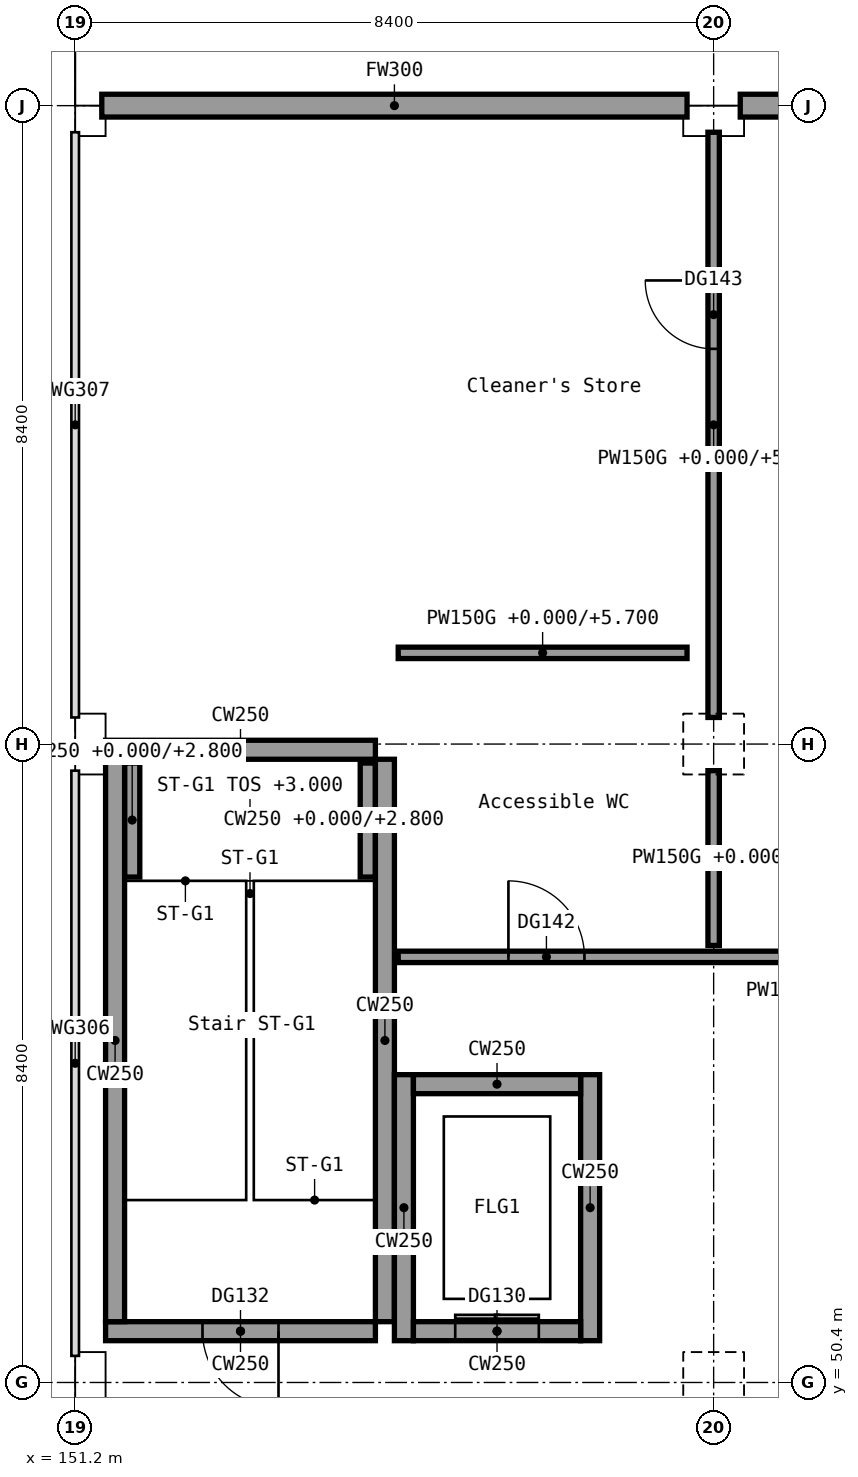
"""IFC4 building model, lengths in metres.
Left out: names, types, materials, properties, quantities, classifications, styles, units other than length and angle.
Written with IfcOpenShell. Run it as: python <this file> out.ifc"""

import sys

from ifc_helpers import new_model, si_unit, direction, frame, frame_2d, origin, origin_2d, place, context, subcontext, project, spatial, rectangle, extrude, element, fill, save


model = new_model("IFC4")
c1 = context("Model", 3, precision=1e-05, world=origin(), true_north=direction((0.0, 1.0)))
c2 = subcontext(c1, "Body", "Model", "MODEL_VIEW")
j1 = project(units=[si_unit("LENGTHUNIT", "METRE"), si_unit("PLANEANGLEUNIT", "RADIAN")], contexts=[c1])
p1 = place(None, origin())
s1 = spatial("IfcSite", under=j1, at=p1, CompositionType="ELEMENT")
p2 = place(p1, origin())
s2 = spatial("IfcBuilding", under=s1, at=p2, CompositionType="ELEMENT")
p3 = place(p2, origin())
s3 = spatial("IfcBuildingStorey", under=s2, at=p3, CompositionType="ELEMENT", Elevation=0.0)
for number, where, z_axis, x_axis in (
    (1, (151.2, 50.4, 0.0), (0.0, 0.0, 1.0), (1.0, 0.0, 0.0)),
    (2, (151.2, 58.8, 0.0), (0.0, 0.0, 1.0), (1.0, 0.0, 0.0)),
    (3, (151.2, 67.2, 0.0), (0.0, 0.0, 1.0), (1.0, 0.0, 0.0)),
    (4, (159.6, 50.4, 0.0), (0.0, 0.0, 1.0), (1.0, 0.0, 0.0)),
    (5, (159.6, 58.8, 0.0), (0.0, 0.0, 1.0), (1.0, 0.0, 0.0)),
    (6, (159.6, 67.2, 0.0), (0.0, 0.0, 1.0), (1.0, 0.0, 0.0)),
):
    element("IfcColumn", number, at=place(p3, frame(where, z_axis=z_axis, x_axis=x_axis)), inside=s3, PredefinedType="COLUMN", context=c2, shape_type="SweptSolid", body=[
        extrude(rectangle(XDim=0.7, YDim=0.7, at=origin_2d()), origin(), (0.0, 0.0, 1.0), 6.0),
    ])
p4 = place(p3, frame((151.55, 67.2, 0.0), z_axis=(0.0, 0.0, 1.0), x_axis=(1.0, 0.0, 0.0)))
e7 = element("IfcWall", 7, at=p4, inside=s3, PredefinedType="STANDARD", context=c2, shape_type="SweptSolid", body=[
    extrude(rectangle(XDim=7.7, YDim=0.3, at=frame_2d((3.85, 0.0))), origin(), (0.0, 0.0, 1.0), 6.0),
])
p5 = place(p3, frame((159.95, 67.2, 0.0), z_axis=(0.0, 0.0, 1.0), x_axis=(1.0, 0.0, 0.0)))
e8 = element("IfcWall", 8, at=p5, inside=s3, PredefinedType="STANDARD", context=c2, shape_type="SweptSolid", body=[
    extrude(rectangle(XDim=7.7, YDim=0.3, at=frame_2d((3.85, 0.0))), origin(), (0.0, 0.0, 1.0), 6.0),
])
p6 = place(p5, frame((2.95, 0.0, 0.9)))
e9 = element("IfcOpeningElement", 9, at=p6, cuts=e8, PredefinedType="OPENING", context=c2, shape_type="SweptSolid", body=[
    extrude(rectangle(XDim=1.8, YDim=1.5, at=frame_2d((0.9, 0.75))), frame((0.0, 0.15, 0.0), z_axis=(0.0, -1.0, 0.0), x_axis=(1.0, 0.0, 0.0)), (0.0, 0.0, 1.0), 0.3),
])
for number, where, z_axis, x_axis in (
    (10, (155.05, 57.05, 0.0), (0.0, 0.0, 1.0), (0.0, 1.0, 0.0)),
    (11, (151.95, 58.55, 0.0), (0.0, 0.0, 1.0), (0.0, -1.0, 0.0)),
):
    element("IfcWall", number, at=place(p3, frame(where, z_axis=z_axis, x_axis=x_axis)), inside=s3, PredefinedType="SHEAR", context=c2, shape_type="SweptSolid", body=[
        extrude(rectangle(XDim=1.5, YDim=0.2, at=frame_2d((0.75, 0.0))), origin(), (0.0, 0.0, 1.0), 2.8),
    ])
p7 = place(p3, frame((155.15, 51.075, 0.0), z_axis=(0.0, 0.0, 1.0), x_axis=(-1.0, 0.0, 0.0)))
e12 = element("IfcWall", 12, at=p7, inside=s3, PredefinedType="SHEAR", context=c2, shape_type="SweptSolid", body=[
    extrude(rectangle(XDim=3.55, YDim=0.25, at=frame_2d((1.775, 0.0))), origin(), (0.0, 0.0, 1.0), 6.0),
])
p8 = place(p7, frame((1.275, 0.0, 0.0)))
e13 = element("IfcOpeningElement", 13, at=p8, cuts=e12, PredefinedType="OPENING", context=c2, shape_type="SweptSolid", body=[
    extrude(rectangle(XDim=1.0, YDim=2.1, at=frame_2d((0.5, 1.05))), frame((0.0, 0.125, 0.0), z_axis=(0.0, -1.0, 0.0), x_axis=(1.0, 0.0, 0.0)), (0.0, 0.0, 1.0), 0.25),
])
p9 = place(p3, frame((155.15, 58.725, 0.0), z_axis=(0.0, 0.0, 1.0), x_axis=(-1.0, 0.0, 0.0)))
e14 = element("IfcWall", 14, at=p9, inside=s3, PredefinedType="SHEAR", context=c2, shape_type="SweptSolid", body=[
    extrude(rectangle(XDim=3.55, YDim=0.25, at=frame_2d((1.775, 0.0))), origin(), (0.0, 0.0, 1.0), 6.0),
])
for number, where, z_axis, x_axis in (
    (15, (151.725, 51.2, 0.0), (0.0, 0.0, 1.0), (0.0, 1.0, 0.0)),
    (16, (155.275, 51.2, 0.0), (0.0, 0.0, 1.0), (0.0, 1.0, 0.0)),
):
    element("IfcWall", number, at=place(p3, frame(where, z_axis=z_axis, x_axis=x_axis)), inside=s3, PredefinedType="SHEAR", context=c2, shape_type="SweptSolid", body=[
        extrude(rectangle(XDim=7.4, YDim=0.25, at=frame_2d((3.7, 0.0))), origin(), (0.0, 0.0, 1.0), 6.0),
    ])
for number, where, z_axis, x_axis in (
    (17, (155.525, 50.95, 0.0), (0.0, 0.0, 1.0), (0.0, 1.0, 0.0)),
    (18, (157.975, 50.95, 0.0), (0.0, 0.0, 1.0), (0.0, 1.0, 0.0)),
):
    element("IfcWall", number, at=place(p3, frame(where, z_axis=z_axis, x_axis=x_axis)), inside=s3, PredefinedType="SHEAR", context=c2, shape_type="SweptSolid", body=[
        extrude(rectangle(XDim=3.5, YDim=0.25, at=frame_2d((1.75, 0.0))), origin(), (0.0, 0.0, 1.0), 6.0),
    ])
p10 = place(p3, frame((155.65, 51.075, 0.0), z_axis=(0.0, 0.0, 1.0), x_axis=(1.0, 0.0, 0.0)))
e19 = element("IfcWall", 19, at=p10, inside=s3, PredefinedType="SHEAR", context=c2, shape_type="SweptSolid", body=[
    extrude(rectangle(XDim=2.2, YDim=0.25, at=frame_2d((1.1, 0.0))), origin(), (0.0, 0.0, 1.0), 6.0),
])
p11 = place(p10, frame((0.55, 0.0, 0.0)))
e20 = element("IfcOpeningElement", 20, at=p11, cuts=e19, PredefinedType="OPENING", context=c2, shape_type="SweptSolid", body=[
    extrude(rectangle(XDim=1.1, YDim=2.1, at=frame_2d((0.55, 1.05))), frame((0.0, 0.125, 0.0), z_axis=(0.0, -1.0, 0.0), x_axis=(1.0, 0.0, 0.0)), (0.0, 0.0, 1.0), 0.25),
])
p12 = place(p3, frame((155.65, 54.325, 0.0), z_axis=(0.0, 0.0, 1.0), x_axis=(1.0, 0.0, 0.0)))
e21 = element("IfcWall", 21, at=p12, inside=s3, PredefinedType="SHEAR", context=c2, shape_type="SweptSolid", body=[
    extrude(rectangle(XDim=2.2, YDim=0.25, at=frame_2d((1.1, 0.0))), origin(), (0.0, 0.0, 1.0), 6.0),
])
p13 = place(p3, frame((155.45, 56.0, 0.0), z_axis=(0.0, 0.0, 1.0), x_axis=(1.0, 0.0, 0.0)))
e22 = element("IfcWall", 22, at=p13, inside=s3, PredefinedType="PARTITIONING", context=c2, shape_type="SweptSolid", body=[
    extrude(rectangle(XDim=12.2, YDim=0.15, at=frame_2d((6.1, 0.0))), origin(), (0.0, 0.0, 1.0), 5.7),
])
p14 = place(p13, frame((7.55, 0.0, 0.0)))
e23 = element("IfcOpeningElement", 23, at=p14, cuts=e22, PredefinedType="OPENING", context=c2, shape_type="SweptSolid", body=[
    extrude(rectangle(XDim=1.0, YDim=2.1, at=frame_2d((0.5, 1.05))), frame((0.0, 0.075, 0.0), z_axis=(0.0, -1.0, 0.0), x_axis=(1.0, 0.0, 0.0)), (0.0, 0.0, 1.0), 0.15),
])
p15 = place(p13, frame((1.45, 0.0, 0.0)))
e24 = element("IfcOpeningElement", 24, at=p15, cuts=e22, PredefinedType="OPENING", context=c2, shape_type="SweptSolid", body=[
    extrude(rectangle(XDim=1.0, YDim=2.1, at=frame_2d((0.5, 1.05))), frame((0.0, 0.075, 0.0), z_axis=(0.0, -1.0, 0.0), x_axis=(1.0, 0.0, 0.0)), (0.0, 0.0, 1.0), 0.15),
])
p16 = place(p3, frame((159.6, 56.15, 0.0), z_axis=(0.0, 0.0, 1.0), x_axis=(0.0, 1.0, 0.0)))
e25 = element("IfcWall", 25, at=p16, inside=s3, PredefinedType="PARTITIONING", context=c2, shape_type="SweptSolid", body=[
    extrude(rectangle(XDim=2.3, YDim=0.15, at=frame_2d((1.15, 0.0))), origin(), (0.0, 0.0, 1.0), 5.05),
])
p17 = place(p3, frame((159.6, 59.15, 0.0), z_axis=(0.0, 0.0, 1.0), x_axis=(0.0, 1.0, 0.0)))
e26 = element("IfcWall", 26, at=p17, inside=s3, PredefinedType="PARTITIONING", context=c2, shape_type="SweptSolid", body=[
    extrude(rectangle(XDim=7.7, YDim=0.15, at=frame_2d((3.85, 0.0))), origin(), (0.0, 0.0, 1.0), 5.05),
])
p18 = place(p17, frame((4.85, 0.0, 0.0)))
e27 = element("IfcOpeningElement", 27, at=p18, cuts=e26, PredefinedType="OPENING", context=c2, shape_type="SweptSolid", body=[
    extrude(rectangle(XDim=0.9, YDim=2.1, at=frame_2d((0.45, 1.05))), frame((0.0, 0.075, 0.0), z_axis=(0.0, -1.0, 0.0), x_axis=(1.0, 0.0, 0.0)), (0.0, 0.0, 1.0), 0.15),
])
p19 = place(p3, frame((155.45, 60.0, 0.0), z_axis=(0.0, 0.0, 1.0), x_axis=(1.0, 0.0, 0.0)))
e28 = element("IfcWall", 28, at=p19, inside=s3, PredefinedType="PARTITIONING", context=c2, shape_type="SweptSolid", body=[
    extrude(rectangle(XDim=3.8, YDim=0.15, at=frame_2d((1.9, 0.0))), origin(), (0.0, 0.0, 1.0), 5.7),
])
p20 = place(p11, origin())
e29 = element("IfcDoor", 29, at=p20, inside=s3, OperationType="DOUBLE_DOOR_SLIDING", PredefinedType="DOOR", context=c2, shape_type="SweptSolid", body=[
    extrude(rectangle(XDim=1.1, YDim=2.1, at=frame_2d((0.55, 1.05))), frame((0.0, 0.025, 0.0), z_axis=(0.0, -1.0, 0.0), x_axis=(1.0, 0.0, 0.0)), (0.0, 0.0, 1.0), 0.05),
])
fill(e20, e29)
p21 = place(p8, origin())
e30 = element("IfcDoor", 30, at=p21, inside=s3, OperationType="SINGLE_SWING_LEFT", PredefinedType="DOOR", context=c2, shape_type="SweptSolid", body=[
    extrude(rectangle(XDim=1.0, YDim=2.1, at=frame_2d((0.5, 1.05))), frame((0.0, 0.025, 0.0), z_axis=(0.0, -1.0, 0.0), x_axis=(1.0, 0.0, 0.0)), (0.0, 0.0, 1.0), 0.05),
])
fill(e13, e30)
p22 = place(p15, origin())
e31 = element("IfcDoor", 31, at=p22, inside=s3, OperationType="SINGLE_SWING_LEFT", PredefinedType="DOOR", context=c2, shape_type="SweptSolid", body=[
    extrude(rectangle(XDim=1.0, YDim=2.1, at=frame_2d((0.5, 1.05))), frame((0.0, 0.025, 0.0), z_axis=(0.0, -1.0, 0.0), x_axis=(1.0, 0.0, 0.0)), (0.0, 0.0, 1.0), 0.05),
])
fill(e24, e31)
p23 = place(p18, origin())
e32 = element("IfcDoor", 32, at=p23, inside=s3, OperationType="SINGLE_SWING_RIGHT", PredefinedType="DOOR", context=c2, shape_type="SweptSolid", body=[
    extrude(rectangle(XDim=0.9, YDim=2.1, at=frame_2d((0.45, 1.05))), frame((0.0, 0.025, 0.0), z_axis=(0.0, -1.0, 0.0), x_axis=(1.0, 0.0, 0.0)), (0.0, 0.0, 1.0), 0.05),
])
fill(e27, e32)
save(model, sys.argv[1])
